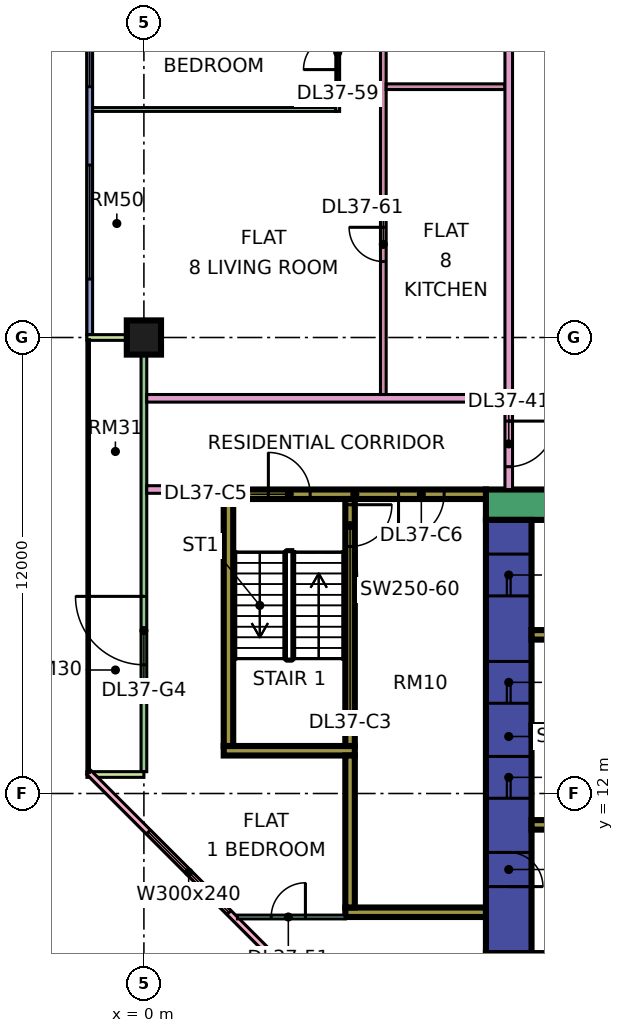
"""IFC4 building model, lengths in metres.
Left out: names, types, materials, properties, quantities, classifications, styles, units other than length and angle.
Written with IfcOpenShell. Run it as: python <this file> out.ifc"""

import sys

from ifc_helpers import new_model, si_unit, direction, frame, frame_2d, origin, origin_2d, place, context, subcontext, project, spatial, rectangle, extrude, element, fill, save


model = new_model("IFC4")
c1 = context("Model", 3, precision=1e-05, world=origin(), true_north=direction((0.0, 1.0)))
c2 = subcontext(c1, "Body", "Model", "MODEL_VIEW")
j1 = project(units=[si_unit("LENGTHUNIT", "METRE"), si_unit("PLANEANGLEUNIT", "RADIAN")], contexts=[c1])
p1 = place(None, origin())
s1 = spatial("IfcSite", under=j1, at=p1, CompositionType="ELEMENT")
p2 = place(p1, origin())
s2 = spatial("IfcBuilding", under=s1, at=p2, CompositionType="ELEMENT")
p3 = place(p2, frame((0.0, 0.0, 164.9)))
s3 = spatial("IfcBuildingStorey", under=s2, at=p3, CompositionType="ELEMENT", Elevation=164.9)
p4 = place(p3, frame((0.0, 24.0, 0.0), z_axis=(0.0, 0.0, 1.0), x_axis=(1.0, 0.0, 0.0)))
e1 = element("IfcColumn", 1, at=p4, inside=s3, PredefinedType="COLUMN", context=c2, shape_type="SweptSolid", body=[
    extrude(rectangle(XDim=0.9, YDim=0.9, at=origin_2d()), origin(), (0.0, 0.0, 1.0), 3.75),
])
p5 = place(p3, frame((9.0, 19.6, 0.0), z_axis=(0.0, 0.0, 1.0), x_axis=(1.0, 0.0, 0.0)))
e2 = element("IfcWall", 2, at=p5, inside=s3, PredefinedType="SHEAR", context=c2, shape_type="SweptSolid", body=[
    extrude(rectangle(XDim=25.0, YDim=0.8, at=frame_2d((12.5, 0.0))), origin(), (0.0, 0.0, 1.0), 3.75),
])
p6 = place(p5, frame((19.1, 0.0, 0.0)))
e3 = element("IfcOpeningElement", 3, at=p6, cuts=e2, PredefinedType="OPENING", context=c2, shape_type="SweptSolid", body=[
    extrude(rectangle(XDim=1.8, YDim=2.4, at=frame_2d((0.9, 1.2))), frame((0.0, 0.41, 0.0), z_axis=(0.0, -1.0, 0.0), x_axis=(1.0, 0.0, 0.0)), (0.0, 0.0, 1.0), 0.82),
])
p7 = place(p3, frame((9.6, 7.8, 0.0), z_axis=(0.0, 0.0, 1.0), x_axis=(0.0, 1.0, 0.0)))
e4 = element("IfcWall", 4, at=p7, inside=s3, PredefinedType="SHEAR", context=c2, shape_type="SweptSolid", body=[
    extrude(rectangle(XDim=11.4, YDim=1.2, at=frame_2d((5.7, 0.0))), origin(), (0.0, 0.0, 1.0), 3.75),
])
p8 = place(p7, frame((4.075, 0.0, 0.0)))
e5 = element("IfcOpeningElement", 5, at=p8, cuts=e4, PredefinedType="OPENING", context=c2, shape_type="SweptSolid", body=[
    extrude(rectangle(XDim=1.1, YDim=2.2, at=frame_2d((0.55, 1.1))), frame((0.0, 0.61, 0.0), z_axis=(0.0, -1.0, 0.0), x_axis=(1.0, 0.0, 0.0)), (0.0, 0.0, 1.0), 1.22),
])
p9 = place(p7, frame((6.575, 0.0, 0.0)))
e6 = element("IfcOpeningElement", 6, at=p9, cuts=e4, PredefinedType="OPENING", context=c2, shape_type="SweptSolid", body=[
    extrude(rectangle(XDim=1.1, YDim=2.2, at=frame_2d((0.55, 1.1))), frame((0.0, 0.61, 0.0), z_axis=(0.0, -1.0, 0.0), x_axis=(1.0, 0.0, 0.0)), (0.0, 0.0, 1.0), 1.22),
])
p10 = place(p7, frame((9.4, 0.0, 0.0)))
e7 = element("IfcOpeningElement", 7, at=p10, cuts=e4, PredefinedType="OPENING", context=c2, shape_type="SweptSolid", body=[
    extrude(rectangle(XDim=1.1, YDim=2.2, at=frame_2d((0.55, 1.1))), frame((0.0, 0.61, 0.0), z_axis=(0.0, -1.0, 0.0), x_axis=(1.0, 0.0, 0.0)), (0.0, 0.0, 1.0), 1.22),
])
p11 = place(p7, frame((1.75, 0.0, 0.0)))
e8 = element("IfcOpeningElement", 8, at=p11, cuts=e4, PredefinedType="OPENING", context=c2, shape_type="SweptSolid", body=[
    extrude(rectangle(XDim=0.9, YDim=2.1, at=frame_2d((0.45, 1.05))), frame((0.0, 0.61, 0.0), z_axis=(0.0, -1.0, 0.0), x_axis=(1.0, 0.0, 0.0)), (0.0, 0.0, 1.0), 1.22),
])
for number, where, z_axis, x_axis in (
    (9, (10.2, 11.175, 0.0), (0.0, 0.0, 1.0), (1.0, 0.0, 0.0)),
    (10, (10.2, 13.675, 0.0), (0.0, 0.0, 1.0), (1.0, 0.0, 0.0)),
    (11, (10.2, 16.175, 0.0), (0.0, 0.0, 1.0), (1.0, 0.0, 0.0)),
):
    element("IfcWall", number, at=place(p3, frame(where, z_axis=z_axis, x_axis=x_axis)), inside=s3, PredefinedType="SHEAR", context=c2, shape_type="SweptSolid", body=[
        extrude(rectangle(XDim=3.0, YDim=0.25, at=frame_2d((1.5, 0.0))), origin(), (0.0, 0.0, 1.0), 3.75),
    ])
p12 = place(p3, frame((2.1, 19.875, 0.0), z_axis=(0.0, 0.0, 1.0), x_axis=(1.0, 0.0, 0.0)))
e12 = element("IfcWall", 12, at=p12, inside=s3, PredefinedType="SHEAR", context=c2, shape_type="SweptSolid", body=[
    extrude(rectangle(XDim=6.9, YDim=0.25, at=frame_2d((3.45, 0.0))), origin(), (0.0, 0.0, 1.0), 3.75),
])
p13 = place(p12, frame((1.175, 0.0, 0.0)))
e13 = element("IfcOpeningElement", 13, at=p13, cuts=e12, PredefinedType="OPENING", context=c2, shape_type="SweptSolid", body=[
    extrude(rectangle(XDim=1.1, YDim=2.2, at=frame_2d((0.55, 1.1))), frame((0.0, 0.135, 0.0), z_axis=(0.0, -1.0, 0.0), x_axis=(1.0, 0.0, 0.0)), (0.0, 0.0, 1.0), 0.27),
])
p14 = place(p12, frame((4.6, 0.0, 0.0)))
e14 = element("IfcOpeningElement", 14, at=p14, cuts=e12, PredefinedType="OPENING", context=c2, shape_type="SweptSolid", body=[
    extrude(rectangle(XDim=1.2, YDim=2.2, at=frame_2d((0.6, 1.1))), frame((0.0, 0.135, 0.0), z_axis=(0.0, -1.0, 0.0), x_axis=(1.0, 0.0, 0.0)), (0.0, 0.0, 1.0), 0.27),
])
p15 = place(p3, frame((2.1, 13.125, 0.0), z_axis=(0.0, 0.0, 1.0), x_axis=(1.0, 0.0, 0.0)))
e15 = element("IfcWall", 15, at=p15, inside=s3, PredefinedType="SHEAR", context=c2, shape_type="SweptSolid", body=[
    extrude(rectangle(XDim=3.45, YDim=0.25, at=frame_2d((1.725, 0.0))), origin(), (0.0, 0.0, 1.0), 3.75),
])
p16 = place(p3, frame((2.225, 13.25, 0.0), z_axis=(0.0, 0.0, 1.0), x_axis=(0.0, 1.0, 0.0)))
e16 = element("IfcWall", 16, at=p16, inside=s3, PredefinedType="SHEAR", context=c2, shape_type="SweptSolid", body=[
    extrude(rectangle(XDim=6.5, YDim=0.25, at=frame_2d((3.25, 0.0))), origin(), (0.0, 0.0, 1.0), 3.75),
])
p17 = place(p3, frame((5.425, 13.25, 0.0), z_axis=(0.0, 0.0, 1.0), x_axis=(0.0, 1.0, 0.0)))
e17 = element("IfcWall", 17, at=p17, inside=s3, PredefinedType="SHEAR", context=c2, shape_type="SweptSolid", body=[
    extrude(rectangle(XDim=6.5, YDim=0.25, at=frame_2d((3.25, 0.0))), origin(), (0.0, 0.0, 1.0), 3.75),
])
p18 = place(p17, frame((5.25, 0.0, 0.0)))
e18 = element("IfcOpeningElement", 18, at=p18, cuts=e17, PredefinedType="OPENING", context=c2, shape_type="SweptSolid", body=[
    extrude(rectangle(XDim=1.1, YDim=2.2, at=frame_2d((0.55, 1.1))), frame((0.0, 0.135, 0.0), z_axis=(0.0, -1.0, 0.0), x_axis=(1.0, 0.0, 0.0)), (0.0, 0.0, 1.0), 0.27),
])
p19 = place(p3, frame((5.3, 8.875, 0.0), z_axis=(0.0, 0.0, 1.0), x_axis=(1.0, 0.0, 0.0)))
e19 = element("IfcWall", 19, at=p19, inside=s3, PredefinedType="SHEAR", context=c2, shape_type="SweptSolid", body=[
    extrude(rectangle(XDim=3.7, YDim=0.25, at=frame_2d((1.85, 0.0))), origin(), (0.0, 0.0, 1.0), 3.75),
])
p20 = place(p3, frame((5.425, 9.0, 0.0), z_axis=(0.0, 0.0, 1.0), x_axis=(0.0, 1.0, 0.0)))
e20 = element("IfcWall", 20, at=p20, inside=s3, PredefinedType="SHEAR", context=c2, shape_type="SweptSolid", body=[
    extrude(rectangle(XDim=4.0, YDim=0.25, at=frame_2d((2.0, 0.0))), origin(), (0.0, 0.0, 1.0), 3.75),
])
p21 = place(p3, frame((-1.425, 35.925, 0.0), z_axis=(0.0, 0.0, 1.0), x_axis=(0.0, -1.0, 0.0)))
e21 = element("IfcWall", 21, at=p21, inside=s3, PredefinedType="SOLIDWALL", context=c2, shape_type="SweptSolid", body=[
    extrude(rectangle(XDim=11.85, YDim=0.15, at=frame_2d((5.925, 0.0))), origin(), (0.0, 0.0, 1.0), 3.35),
])
p22 = place(p21, frame((0.562, 0.0, 0.45)))
e22 = element("IfcOpeningElement", 22, at=p22, cuts=e21, PredefinedType="OPENING", context=c2, shape_type="SweptSolid", body=[
    extrude(rectangle(XDim=1.8, YDim=2.4, at=frame_2d((0.9, 1.2))), frame((0.0, 0.085, 0.0), z_axis=(0.0, -1.0, 0.0), x_axis=(1.0, 0.0, 0.0)), (0.0, 0.0, 1.0), 0.17),
])
p23 = place(p21, frame((3.525, 0.0, 0.45)))
e23 = element("IfcOpeningElement", 23, at=p23, cuts=e21, PredefinedType="OPENING", context=c2, shape_type="SweptSolid", body=[
    extrude(rectangle(XDim=1.8, YDim=2.4, at=frame_2d((0.9, 1.2))), frame((0.0, 0.085, 0.0), z_axis=(0.0, -1.0, 0.0), x_axis=(1.0, 0.0, 0.0)), (0.0, 0.0, 1.0), 0.17),
])
p24 = place(p21, frame((7.387, 0.0, 0.45)))
e24 = element("IfcOpeningElement", 24, at=p24, cuts=e21, PredefinedType="OPENING", context=c2, shape_type="SweptSolid", body=[
    extrude(rectangle(XDim=3.0, YDim=2.4, at=frame_2d((1.5, 1.2))), frame((0.0, 0.085, 0.0), z_axis=(0.0, -1.0, 0.0), x_axis=(1.0, 0.0, 0.0)), (0.0, 0.0, 1.0), 0.17),
])
p25 = place(p3, frame((0.0, 23.925, 0.0), z_axis=(0.0, 0.0, 1.0), x_axis=(0.0, -1.0, 0.0)))
e25 = element("IfcWall", 25, at=p25, inside=s3, PredefinedType="SOLIDWALL", context=c2, shape_type="SweptSolid", body=[
    extrude(rectangle(XDim=11.35, YDim=0.15, at=frame_2d((5.675, 0.0))), origin(), (0.0, 0.0, 1.0), 3.35),
])
p26 = place(p25, frame((6.738, 0.0, 0.0)))
e26 = element("IfcOpeningElement", 26, at=p26, cuts=e25, PredefinedType="OPENING", context=c2, shape_type="SweptSolid", body=[
    extrude(rectangle(XDim=1.8, YDim=2.4, at=frame_2d((0.9, 1.2))), frame((0.0, 0.085, 0.0), z_axis=(0.0, -1.0, 0.0), x_axis=(1.0, 0.0, 0.0)), (0.0, 0.0, 1.0), 0.17),
])
for number, where, z_axis, x_axis in (
    (27, (-1.5, 24.0, 0.0), (0.0, 0.0, 1.0), (1.0, 0.0, 0.0)),
    (28, (-1.5, 12.5, 0.0), (0.0, 0.0, 1.0), (1.0, 0.0, 0.0)),
):
    element("IfcWall", number, at=place(p3, frame(where, z_axis=z_axis, x_axis=x_axis)), inside=s3, PredefinedType="SOLIDWALL", context=c2, shape_type="SweptSolid", body=[
        extrude(rectangle(XDim=1.5, YDim=0.15, at=frame_2d((0.75, 0.0))), origin(), (0.0, 0.0, 1.0), 3.35),
    ])
p27 = place(p3, frame((-1.447, 12.553, 0.0), z_axis=(0.0, 0.0, 1.0), x_axis=(0.707106781187, -0.707106781187, 0.0)))
e29 = element("IfcWall", 29, at=p27, inside=s3, PredefinedType="SOLIDWALL", context=c2, shape_type="SweptSolid", body=[
    extrude(rectangle(XDim=19.799, YDim=0.15, at=frame_2d((9.899, 0.0))), origin(), (0.0, 0.0, 1.0), 3.35),
])
p28 = place(p27, frame((2.212, 0.0, 0.45)))
e30 = element("IfcOpeningElement", 30, at=p28, cuts=e29, PredefinedType="OPENING", context=c2, shape_type="SweptSolid", body=[
    extrude(rectangle(XDim=3.0, YDim=2.4, at=frame_2d((1.5, 1.2))), frame((0.0, 0.085, 0.0), z_axis=(0.0, -1.0, 0.0), x_axis=(1.0, 0.0, 0.0)), (0.0, 0.0, 1.0), 0.17),
])
p29 = place(p27, frame((10.216, 0.0, 0.45)))
e31 = element("IfcOpeningElement", 31, at=p29, cuts=e29, PredefinedType="OPENING", context=c2, shape_type="SweptSolid", body=[
    extrude(rectangle(XDim=3.0, YDim=2.4, at=frame_2d((1.5, 1.2))), frame((0.0, 0.085, 0.0), z_axis=(0.0, -1.0, 0.0), x_axis=(1.0, 0.0, 0.0)), (0.0, 0.0, 1.0), 0.17),
])
p30 = place(p3, frame((-1.35, 30.0, 0.0), z_axis=(0.0, 0.0, 1.0), x_axis=(1.0, 0.0, 0.0)))
e32 = element("IfcWall", 32, at=p30, inside=s3, PredefinedType="PARTITIONING", context=c2, shape_type="SweptSolid", body=[
    extrude(rectangle(XDim=6.4, YDim=0.1, at=frame_2d((3.2, 0.0))), origin(), (0.0, 0.0, 1.0), 3.35),
])
p31 = place(p3, frame((0.074, 20.0, 0.0), z_axis=(0.0, 0.0, 1.0), x_axis=(1.0, 0.0, 0.0)))
e33 = element("IfcWall", 33, at=p31, inside=s3, PredefinedType="PARTITIONING", context=c2, shape_type="SweptSolid", body=[
    extrude(rectangle(XDim=2.026, YDim=0.2, at=frame_2d((1.013, 0.0))), origin(), (0.0, 0.0, 1.0), 3.35),
])
p32 = place(p3, frame((0.074, 22.4, 0.0), z_axis=(0.0, 0.0, 1.0), x_axis=(1.0, 0.0, 0.0)))
e34 = element("IfcWall", 34, at=p32, inside=s3, PredefinedType="PARTITIONING", context=c2, shape_type="SweptSolid", body=[
    extrude(rectangle(XDim=9.426, YDim=0.2, at=frame_2d((4.713, 0.0))), origin(), (0.0, 0.0, 1.0), 3.35),
])
p33 = place(p3, frame((2.461, 8.75, 0.0), z_axis=(0.0, 0.0, 1.0), x_axis=(1.0, 0.0, 0.0)))
e35 = element("IfcWall", 35, at=p33, inside=s3, PredefinedType="PARTITIONING", context=c2, shape_type="SweptSolid", body=[
    extrude(rectangle(XDim=2.839, YDim=0.1, at=frame_2d((1.419, 0.0))), origin(), (0.0, 0.0, 1.0), 3.35),
])
p34 = place(p33, frame((0.889, 0.0, 0.0)))
e36 = element("IfcOpeningElement", 36, at=p34, cuts=e35, PredefinedType="OPENING", context=c2, shape_type="SweptSolid", body=[
    extrude(rectangle(XDim=0.9, YDim=2.1, at=frame_2d((0.45, 1.05))), frame((0.0, 0.06, 0.0), z_axis=(0.0, -1.0, 0.0), x_axis=(1.0, 0.0, 0.0)), (0.0, 0.0, 1.0), 0.12),
])
p35 = place(p3, frame((5.1, 29.95, 0.0), z_axis=(0.0, 0.0, 1.0), x_axis=(0.0, 1.0, 0.0)))
e37 = element("IfcWall", 37, at=p35, inside=s3, PredefinedType="PARTITIONING", context=c2, shape_type="SweptSolid", body=[
    extrude(rectangle(XDim=5.95, YDim=0.1, at=frame_2d((2.975, 0.0))), origin(), (0.0, 0.0, 1.0), 3.35),
])
p36 = place(p35, frame((1.1, 0.0, 0.0)))
e38 = element("IfcOpeningElement", 38, at=p36, cuts=e37, PredefinedType="OPENING", context=c2, shape_type="SweptSolid", body=[
    extrude(rectangle(XDim=0.9, YDim=2.1, at=frame_2d((0.45, 1.05))), frame((0.0, 0.06, 0.0), z_axis=(0.0, -1.0, 0.0), x_axis=(1.0, 0.0, 0.0)), (0.0, 0.0, 1.0), 0.12),
])
p37 = place(p35, frame((4.1, 0.0, 0.0)))
e39 = element("IfcOpeningElement", 39, at=p37, cuts=e37, PredefinedType="OPENING", context=c2, shape_type="SweptSolid", body=[
    extrude(rectangle(XDim=0.9, YDim=2.1, at=frame_2d((0.45, 1.05))), frame((0.0, 0.06, 0.0), z_axis=(0.0, -1.0, 0.0), x_axis=(1.0, 0.0, 0.0)), (0.0, 0.0, 1.0), 0.12),
])
p38 = place(p3, frame((6.3, 22.5, 0.0), z_axis=(0.0, 0.0, 1.0), x_axis=(0.0, 1.0, 0.0)))
e40 = element("IfcWall", 40, at=p38, inside=s3, PredefinedType="PARTITIONING", context=c2, shape_type="SweptSolid", body=[
    extrude(rectangle(XDim=11.175, YDim=0.15, at=frame_2d((5.587, 0.0))), origin(), (0.0, 0.0, 1.0), 3.35),
])
p39 = place(p38, frame((9.15, 0.0, 0.0)))
e41 = element("IfcOpeningElement", 41, at=p39, cuts=e40, PredefinedType="OPENING", context=c2, shape_type="SweptSolid", body=[
    extrude(rectangle(XDim=0.8, YDim=2.1, at=frame_2d((0.4, 1.05))), frame((0.0, 0.085, 0.0), z_axis=(0.0, -1.0, 0.0), x_axis=(1.0, 0.0, 0.0)), (0.0, 0.0, 1.0), 0.17),
])
p40 = place(p38, frame((3.5, 0.0, 0.0)))
e42 = element("IfcOpeningElement", 42, at=p40, cuts=e40, PredefinedType="OPENING", context=c2, shape_type="SweptSolid", body=[
    extrude(rectangle(XDim=0.9, YDim=2.1, at=frame_2d((0.45, 1.05))), frame((0.0, 0.085, 0.0), z_axis=(0.0, -1.0, 0.0), x_axis=(1.0, 0.0, 0.0)), (0.0, 0.0, 1.0), 0.17),
])
p41 = place(p3, frame((6.375, 30.6, 0.0), z_axis=(0.0, 0.0, 1.0), x_axis=(1.0, 0.0, 0.0)))
e43 = element("IfcWall", 43, at=p41, inside=s3, PredefinedType="PARTITIONING", context=c2, shape_type="SweptSolid", body=[
    extrude(rectangle(XDim=3.125, YDim=0.15, at=frame_2d((1.562, 0.0))), origin(), (0.0, 0.0, 1.0), 3.35),
])
p42 = place(p3, frame((9.6, 20.0, 0.0), z_axis=(0.0, 0.0, 1.0), x_axis=(0.0, 1.0, 0.0)))
e44 = element("IfcWall", 44, at=p42, inside=s3, PredefinedType="PARTITIONING", context=c2, shape_type="SweptSolid", body=[
    extrude(rectangle(XDim=44.35, YDim=0.2, at=frame_2d((22.175, 0.0))), origin(), (0.0, 0.0, 1.0), 3.35),
])
p43 = place(p42, frame((28.8, 0.0, 0.0)))
e45 = element("IfcOpeningElement", 45, at=p43, cuts=e44, PredefinedType="OPENING", context=c2, shape_type="SweptSolid", body=[
    extrude(rectangle(XDim=1.0, YDim=2.1, at=frame_2d((0.5, 1.05))), frame((0.0, 0.11, 0.0), z_axis=(0.0, -1.0, 0.0), x_axis=(1.0, 0.0, 0.0)), (0.0, 0.0, 1.0), 0.22),
])
p44 = place(p42, frame((32.1, 0.0, 0.0)))
e46 = element("IfcOpeningElement", 46, at=p44, cuts=e44, PredefinedType="OPENING", context=c2, shape_type="SweptSolid", body=[
    extrude(rectangle(XDim=1.0, YDim=2.1, at=frame_2d((0.5, 1.05))), frame((0.0, 0.11, 0.0), z_axis=(0.0, -1.0, 0.0), x_axis=(1.0, 0.0, 0.0)), (0.0, 0.0, 1.0), 0.22),
])
p45 = place(p42, frame((0.6, 0.0, 0.0)))
e47 = element("IfcOpeningElement", 47, at=p45, cuts=e44, PredefinedType="OPENING", context=c2, shape_type="SweptSolid", body=[
    extrude(rectangle(XDim=1.2, YDim=2.1, at=frame_2d((0.6, 1.05))), frame((0.0, 0.11, 0.0), z_axis=(0.0, -1.0, 0.0), x_axis=(1.0, 0.0, 0.0)), (0.0, 0.0, 1.0), 0.22),
])
p46 = place(p42, frame((14.25, 0.0, 0.0)))
e48 = element("IfcOpeningElement", 48, at=p46, cuts=e44, PredefinedType="OPENING", context=c2, shape_type="SweptSolid", body=[
    extrude(rectangle(XDim=1.0, YDim=2.1, at=frame_2d((0.5, 1.05))), frame((0.0, 0.11, 0.0), z_axis=(0.0, -1.0, 0.0), x_axis=(1.0, 0.0, 0.0)), (0.0, 0.0, 1.0), 0.22),
])
p47 = place(p23, origin())
e49 = element("IfcWindow", 49, at=p47, inside=s3, PartitioningType="SINGLE_PANEL", PredefinedType="WINDOW", context=c2, shape_type="SweptSolid", body=[
    extrude(rectangle(XDim=1.8, YDim=2.4, at=frame_2d((0.9, 1.2))), frame((0.0, 0.03, 0.0), z_axis=(0.0, -1.0, 0.0), x_axis=(1.0, 0.0, 0.0)), (0.0, 0.0, 1.0), 0.06),
])
fill(e23, e49)
p48 = place(p24, origin())
e50 = element("IfcWindow", 50, at=p48, inside=s3, PartitioningType="SINGLE_PANEL", PredefinedType="WINDOW", context=c2, shape_type="SweptSolid", body=[
    extrude(rectangle(XDim=3.0, YDim=2.4, at=frame_2d((1.5, 1.2))), frame((0.0, 0.03, 0.0), z_axis=(0.0, -1.0, 0.0), x_axis=(1.0, 0.0, 0.0)), (0.0, 0.0, 1.0), 0.06),
])
fill(e24, e50)
p49 = place(p26, frame((1.8, 0.0, 0.0), z_axis=(0.0, 0.0, 1.0), x_axis=(-1.0, 0.0, 0.0)))
e51 = element("IfcDoor", 51, at=p49, inside=s3, OperationType="DOUBLE_DOOR_SINGLE_SWING", PredefinedType="DOOR", context=c2, shape_type="SweptSolid", body=[
    extrude(rectangle(XDim=1.8, YDim=2.4, at=frame_2d((0.9, 1.2))), frame((0.0, 0.025, 0.0), z_axis=(0.0, -1.0, 0.0), x_axis=(1.0, 0.0, 0.0)), (0.0, 0.0, 1.0), 0.05),
])
fill(e26, e51)
p50 = place(p28, origin())
e52 = element("IfcWindow", 52, at=p50, inside=s3, PartitioningType="SINGLE_PANEL", PredefinedType="WINDOW", context=c2, shape_type="SweptSolid", body=[
    extrude(rectangle(XDim=3.0, YDim=2.4, at=frame_2d((1.5, 1.2))), frame((0.0, 0.03, 0.0), z_axis=(0.0, -1.0, 0.0), x_axis=(1.0, 0.0, 0.0)), (0.0, 0.0, 1.0), 0.06),
])
fill(e30, e52)
p51 = place(p8, origin())
e53 = element("IfcDoor", 53, at=p51, inside=s3, OperationType="DOUBLE_DOOR_SLIDING", PredefinedType="DOOR", context=c2, shape_type="SweptSolid", body=[
    extrude(rectangle(XDim=1.1, YDim=2.2, at=frame_2d((0.55, 1.1))), frame((0.0, 0.025, 0.0), z_axis=(0.0, -1.0, 0.0), x_axis=(1.0, 0.0, 0.0)), (0.0, 0.0, 1.0), 0.05),
])
fill(e5, e53)
p52 = place(p9, origin())
e54 = element("IfcDoor", 54, at=p52, inside=s3, OperationType="DOUBLE_DOOR_SLIDING", PredefinedType="DOOR", context=c2, shape_type="SweptSolid", body=[
    extrude(rectangle(XDim=1.1, YDim=2.2, at=frame_2d((0.55, 1.1))), frame((0.0, 0.025, 0.0), z_axis=(0.0, -1.0, 0.0), x_axis=(1.0, 0.0, 0.0)), (0.0, 0.0, 1.0), 0.05),
])
fill(e6, e54)
p53 = place(p10, origin())
e55 = element("IfcDoor", 55, at=p53, inside=s3, OperationType="DOUBLE_DOOR_SLIDING", PredefinedType="DOOR", context=c2, shape_type="SweptSolid", body=[
    extrude(rectangle(XDim=1.1, YDim=2.2, at=frame_2d((0.55, 1.1))), frame((0.0, 0.025, 0.0), z_axis=(0.0, -1.0, 0.0), x_axis=(1.0, 0.0, 0.0)), (0.0, 0.0, 1.0), 0.05),
])
fill(e7, e55)
p54 = place(p18, origin())
e56 = element("IfcDoor", 56, at=p54, inside=s3, OperationType="SINGLE_SWING_RIGHT", PredefinedType="DOOR", context=c2, shape_type="SweptSolid", body=[
    extrude(rectangle(XDim=1.1, YDim=2.2, at=frame_2d((0.55, 1.1))), frame((0.0, 0.025, 0.0), z_axis=(0.0, -1.0, 0.0), x_axis=(1.0, 0.0, 0.0)), (0.0, 0.0, 1.0), 0.05),
])
fill(e18, e56)
p55 = place(p11, frame((0.9, 0.0, 0.0), z_axis=(0.0, 0.0, 1.0), x_axis=(-1.0, 0.0, 0.0)))
e57 = element("IfcDoor", 57, at=p55, inside=s3, OperationType="SINGLE_SWING_LEFT", PredefinedType="DOOR", context=c2, shape_type="SweptSolid", body=[
    extrude(rectangle(XDim=0.9, YDim=2.1, at=frame_2d((0.45, 1.05))), frame((0.0, 0.025, 0.0), z_axis=(0.0, -1.0, 0.0), x_axis=(1.0, 0.0, 0.0)), (0.0, 0.0, 1.0), 0.05),
])
fill(e8, e57)
p56 = place(p13, origin())
e58 = element("IfcDoor", 58, at=p56, inside=s3, OperationType="SINGLE_SWING_LEFT", PredefinedType="DOOR", context=c2, shape_type="SweptSolid", body=[
    extrude(rectangle(XDim=1.1, YDim=2.2, at=frame_2d((0.55, 1.1))), frame((0.0, 0.025, 0.0), z_axis=(0.0, -1.0, 0.0), x_axis=(1.0, 0.0, 0.0)), (0.0, 0.0, 1.0), 0.05),
])
fill(e13, e58)
p57 = place(p14, frame((1.2, 0.0, 0.0), z_axis=(0.0, 0.0, 1.0), x_axis=(-1.0, 0.0, 0.0)))
e59 = element("IfcDoor", 59, at=p57, inside=s3, OperationType="SINGLE_SWING_LEFT", PredefinedType="DOOR", context=c2, shape_type="SweptSolid", body=[
    extrude(rectangle(XDim=1.2, YDim=2.2, at=frame_2d((0.6, 1.1))), frame((0.0, 0.025, 0.0), z_axis=(0.0, -1.0, 0.0), x_axis=(1.0, 0.0, 0.0)), (0.0, 0.0, 1.0), 0.05),
])
fill(e14, e59)
p58 = place(p45, origin())
e60 = element("IfcDoor", 60, at=p58, inside=s3, OperationType="SINGLE_SWING_RIGHT", PredefinedType="DOOR", context=c2, shape_type="SweptSolid", body=[
    extrude(rectangle(XDim=1.2, YDim=2.1, at=frame_2d((0.6, 1.05))), frame((0.0, 0.025, 0.0), z_axis=(0.0, -1.0, 0.0), x_axis=(1.0, 0.0, 0.0)), (0.0, 0.0, 1.0), 0.05),
])
fill(e47, e60)
p59 = place(p34, frame((0.9, 0.0, 0.0), z_axis=(0.0, 0.0, 1.0), x_axis=(-1.0, 0.0, 0.0)))
e61 = element("IfcDoor", 61, at=p59, inside=s3, OperationType="SINGLE_SWING_RIGHT", PredefinedType="DOOR", context=c2, shape_type="SweptSolid", body=[
    extrude(rectangle(XDim=0.9, YDim=2.1, at=frame_2d((0.45, 1.05))), frame((0.0, 0.025, 0.0), z_axis=(0.0, -1.0, 0.0), x_axis=(1.0, 0.0, 0.0)), (0.0, 0.0, 1.0), 0.05),
])
fill(e36, e61)
p60 = place(p36, origin())
e62 = element("IfcDoor", 62, at=p60, inside=s3, OperationType="SINGLE_SWING_LEFT", PredefinedType="DOOR", context=c2, shape_type="SweptSolid", body=[
    extrude(rectangle(XDim=0.9, YDim=2.1, at=frame_2d((0.45, 1.05))), frame((0.0, 0.025, 0.0), z_axis=(0.0, -1.0, 0.0), x_axis=(1.0, 0.0, 0.0)), (0.0, 0.0, 1.0), 0.05),
])
fill(e38, e62)
p61 = place(p40, frame((0.9, 0.0, 0.0), z_axis=(0.0, 0.0, 1.0), x_axis=(-1.0, 0.0, 0.0)))
e63 = element("IfcDoor", 63, at=p61, inside=s3, OperationType="SINGLE_SWING_RIGHT", PredefinedType="DOOR", context=c2, shape_type="SweptSolid", body=[
    extrude(rectangle(XDim=0.9, YDim=2.1, at=frame_2d((0.45, 1.05))), frame((0.0, 0.025, 0.0), z_axis=(0.0, -1.0, 0.0), x_axis=(1.0, 0.0, 0.0)), (0.0, 0.0, 1.0), 0.05),
])
fill(e42, e63)
save(model, sys.argv[1])
